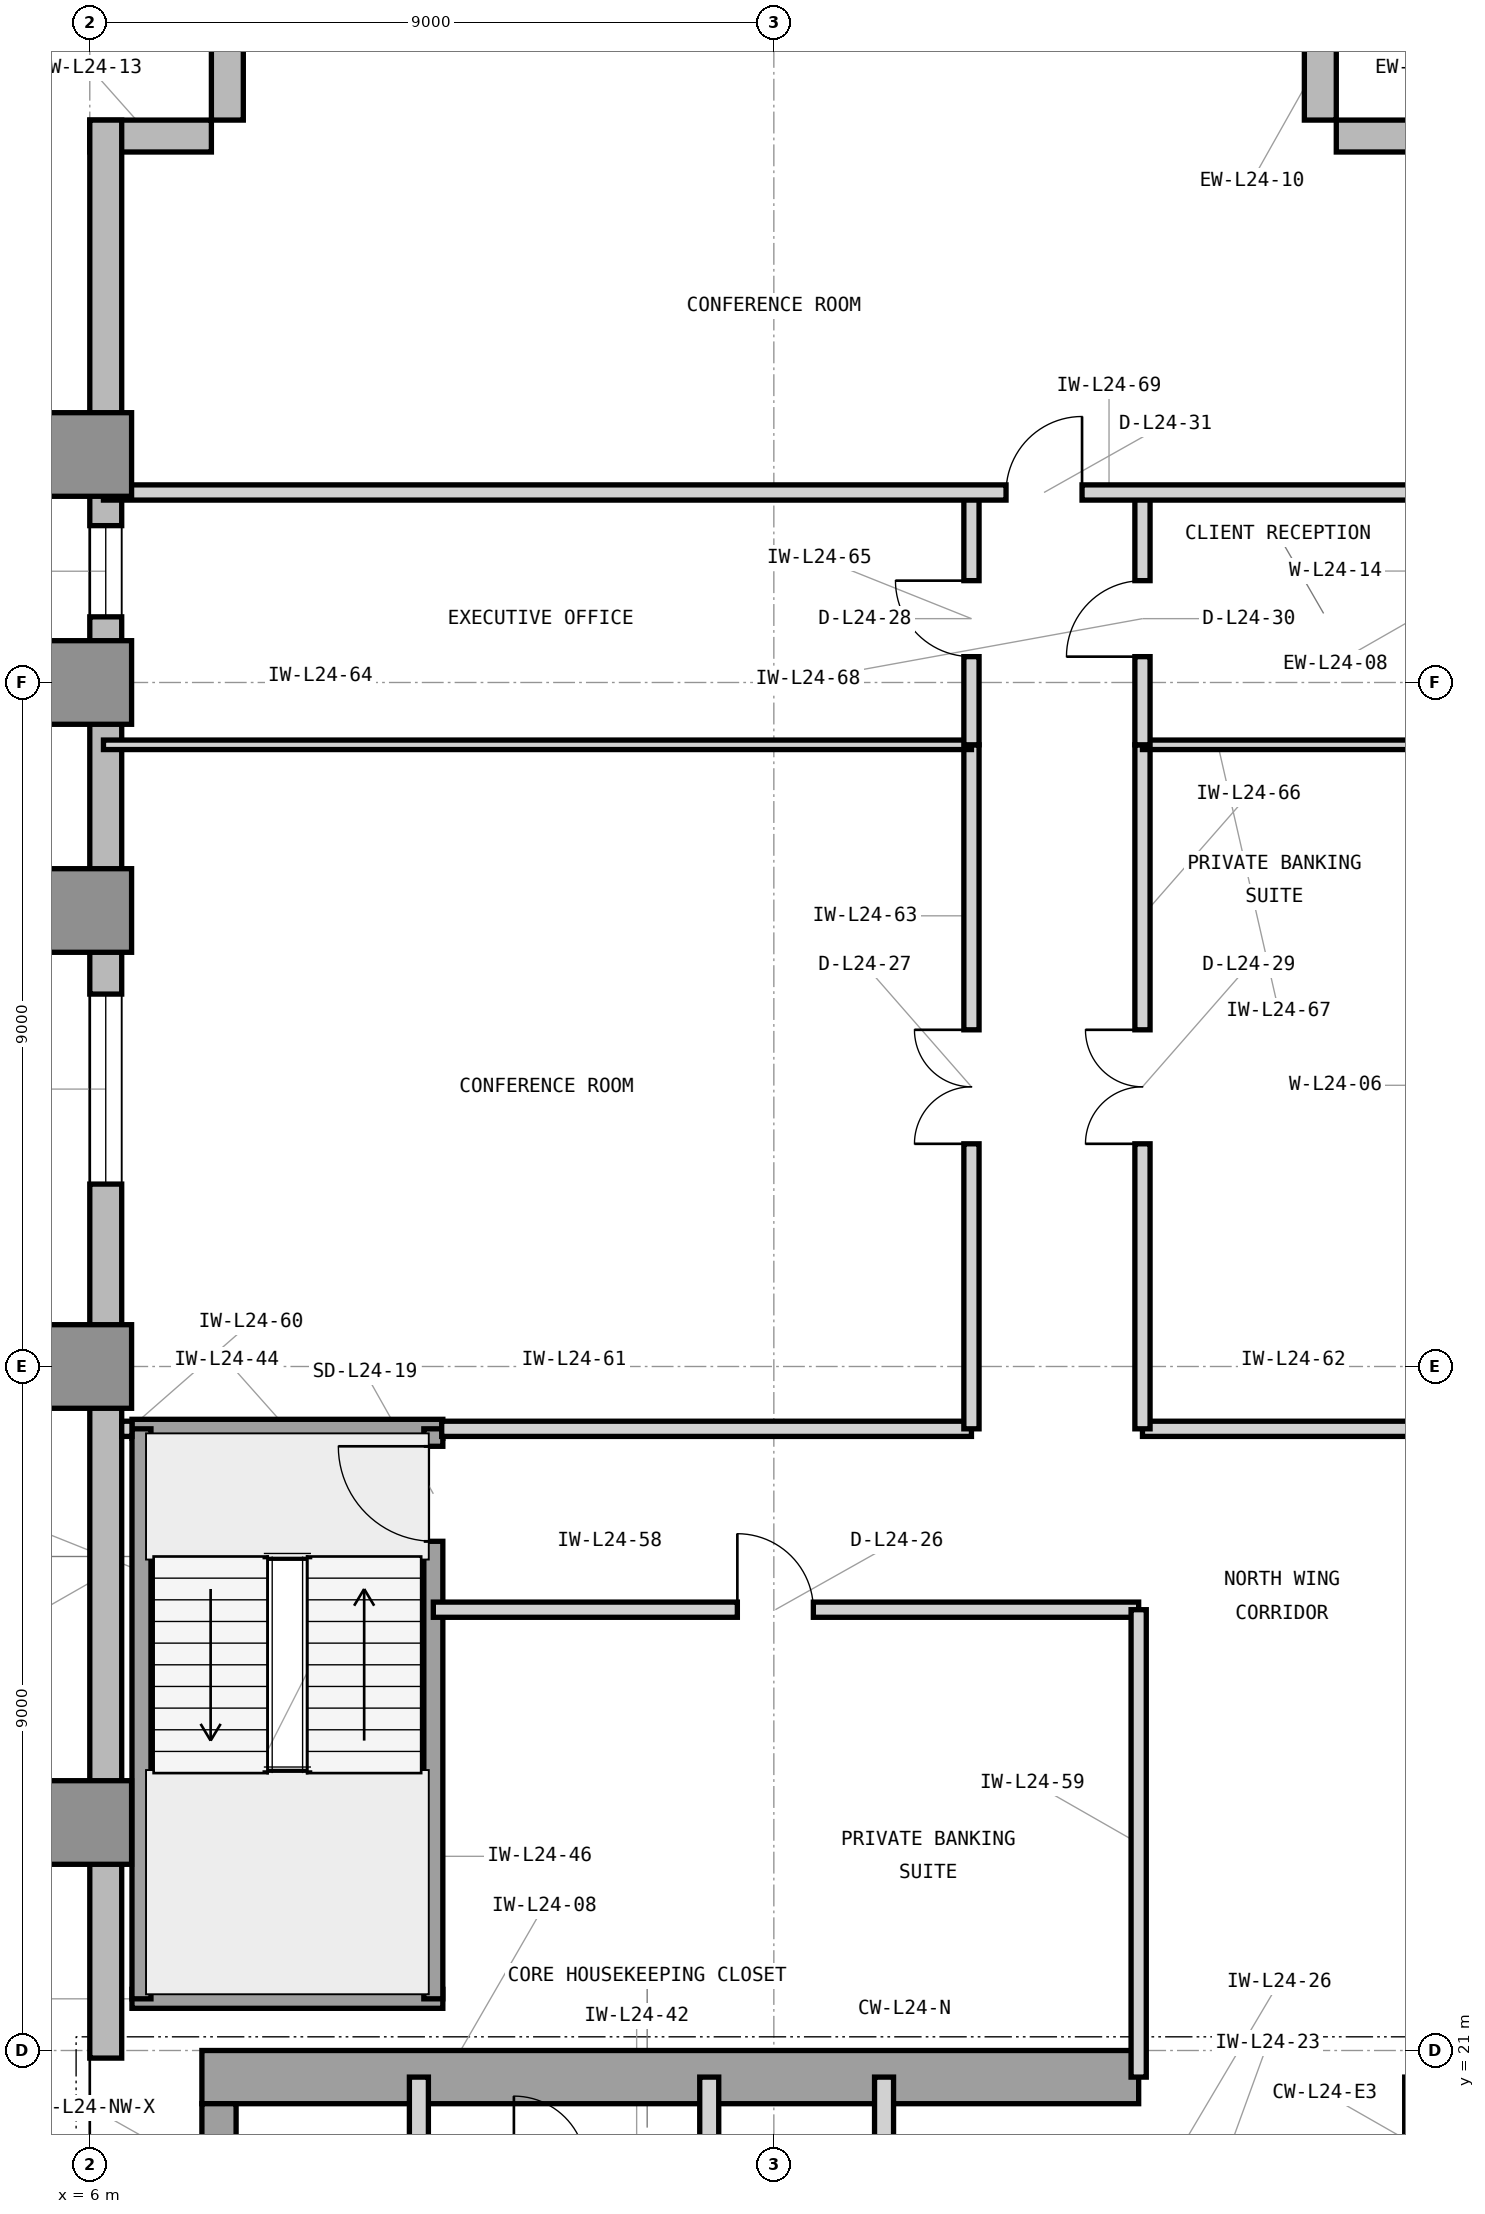
"""IFC4 building model, lengths in metres.
Left out: names, types, materials, properties, quantities, classifications, styles, units other than length and angle.
Written with IfcOpenShell. Run it as: python <this file> out.ifc"""

import sys

from ifc_helpers import new_model, si_unit, direction, frame, frame_2d, origin, origin_2d, place, context, subcontext, project, spatial, rectangle, extrude, element, fill, save


model = new_model("IFC4")
c1 = context("Model", 3, precision=1e-05, world=origin(), true_north=direction((0.0, 1.0)))
c2 = subcontext(c1, "Body", "Model", "MODEL_VIEW")
j1 = project(units=[si_unit("LENGTHUNIT", "METRE"), si_unit("PLANEANGLEUNIT", "RADIAN")], contexts=[c1])
p1 = place(None, origin())
s1 = spatial("IfcSite", under=j1, at=p1, CompositionType="ELEMENT")
p2 = place(p1, origin())
s2 = spatial("IfcBuilding", under=s1, at=p2, CompositionType="ELEMENT")
p3 = place(p2, frame((0.0, 0.0, 105.0)))
s3 = spatial("IfcBuildingStorey", under=s2, at=p3, CompositionType="ELEMENT", Elevation=105.0)
p4 = place(p3, frame((7.475, 20.65, 0.0), z_axis=(0.0, 0.0, 1.0), x_axis=(1.0, 0.0, 0.0)))
e1 = element("IfcWall", 1, at=p4, inside=s3, PredefinedType="SHEAR", context=c2, shape_type="SweptSolid", body=[
    extrude(rectangle(XDim=12.325, YDim=0.7, at=frame_2d((6.163, 0.0))), origin(), (0.0, 0.0, 1.0), 3.9),
])
p5 = place(p3, frame((23.65, 16.6, 0.0), z_axis=(0.0, 0.0, 1.0), x_axis=(0.0, 1.0, 0.0)))
e2 = element("IfcWall", 2, at=p5, inside=s3, PredefinedType="SHEAR", context=c2, shape_type="SweptSolid", body=[
    extrude(rectangle(XDim=4.05, YDim=0.7, at=frame_2d((2.025, 0.0))), origin(), (0.0, 0.0, 1.0), 3.9),
])
p6 = place(p3, frame((7.7, 19.575, 0.0), z_axis=(0.0, 0.0, 1.0), x_axis=(0.0, 1.0, 0.0)))
e3 = element("IfcWall", 3, at=p6, inside=s3, PredefinedType="SHEAR", context=c2, shape_type="SweptSolid", body=[
    extrude(rectangle(XDim=0.725, YDim=0.45, at=frame_2d((0.363, 0.0))), origin(), (0.0, 0.0, 1.0), 3.9),
])
for number, where, z_axis, x_axis in (
    (4, (6.0, 24.0, 0.0), (0.0, 0.0, 1.0), (1.0, 0.0, 0.0)),
    (5, (6.0, 30.0, 0.0), (0.0, 0.0, 1.0), (1.0, 0.0, 0.0)),
    (6, (6.0, 36.0, 0.0), (0.0, 0.0, 1.0), (1.0, 0.0, 0.0)),
    (7, (6.0, 39.0, 0.0), (0.0, 0.0, 1.0), (1.0, 0.0, 0.0)),
    (8, (6.0, 42.0, 0.0), (0.0, 0.0, 1.0), (1.0, 0.0, 0.0)),
):
    element("IfcColumn", number, at=place(p3, frame(where, z_axis=z_axis, x_axis=x_axis)), inside=s3, PredefinedType="COLUMN", context=c2, shape_type="SweptSolid", body=[
        extrude(rectangle(XDim=1.1, YDim=1.1, at=origin_2d()), origin(), (0.0, 0.0, 1.0), 3.9),
    ])
for number, where, z_axis, x_axis in (
    (9, (24.0, 46.19, 0.0), (0.0, 0.0, 1.0), (-1.0, 0.0, 0.0)),
    (10, (22.19, 46.4, 0.0), (0.0, 0.0, 1.0), (0.0, 1.0, 0.0)),
    (11, (7.81, 48.0, 0.0), (0.0, 0.0, 1.0), (0.0, -1.0, 0.0)),
    (12, (7.6, 46.19, 0.0), (0.0, 0.0, 1.0), (-1.0, 0.0, 0.0)),
):
    element("IfcWall", number, at=place(p3, frame(where, z_axis=z_axis, x_axis=x_axis)), inside=s3, PredefinedType="STANDARD", context=c2, shape_type="SweptSolid", body=[
        extrude(rectangle(XDim=1.6, YDim=0.42, at=frame_2d((0.8, 0.0))), origin(), (0.0, 0.0, 1.0), 3.7),
    ])
p7 = place(p3, frame((6.21, 46.4, 0.0), z_axis=(0.0, 0.0, 1.0), x_axis=(0.0, -1.0, 0.0)))
e13 = element("IfcWall", 13, at=p7, inside=s3, PredefinedType="STANDARD", context=c2, shape_type="SweptSolid", body=[
    extrude(rectangle(XDim=25.5, YDim=0.42, at=frame_2d((12.75, 0.0))), origin(), (0.0, 0.0, 1.0), 3.7),
])
p8 = place(p7, frame((11.5, 0.0, 0.85)))
e14 = element("IfcOpeningElement", 14, at=p8, cuts=e13, PredefinedType="OPENING", context=c2, shape_type="SweptSolid", body=[
    extrude(rectangle(XDim=2.5, YDim=2.25, at=frame_2d((1.25, 1.125))), frame((0.0, 0.22, 0.0), z_axis=(0.0, -1.0, 0.0), x_axis=(1.0, 0.0, 0.0)), (0.0, 0.0, 1.0), 0.44),
])
p9 = place(p7, frame((5.336, 0.0, 0.85)))
e15 = element("IfcOpeningElement", 15, at=p9, cuts=e13, PredefinedType="OPENING", context=c2, shape_type="SweptSolid", body=[
    extrude(rectangle(XDim=1.2, YDim=2.25, at=frame_2d((0.6, 1.125))), frame((0.0, 0.22, 0.0), z_axis=(0.0, -1.0, 0.0), x_axis=(1.0, 0.0, 0.0)), (0.0, 0.0, 1.0), 0.44),
])
p10 = place(p3, frame((10.33, 19.45, 0.0), z_axis=(0.0, 0.0, 1.0), x_axis=(0.0, 1.0, 0.0)))
e16 = element("IfcWall", 16, at=p10, inside=s3, PredefinedType="PARTITIONING", context=c2, shape_type="SweptSolid", body=[
    extrude(rectangle(XDim=1.2, YDim=0.25, at=frame_2d((0.6, 0.0))), origin(), (0.0, 0.0, 1.0), 2.917),
])
for number, where, z_axis, x_axis in (
    (17, (14.15, 16.7, 0.0), (0.0, 0.0, 1.0), (0.0, 1.0, 0.0)),
    (18, (16.45, 16.7, 0.0), (0.0, 0.0, 1.0), (0.0, 1.0, 0.0)),
):
    element("IfcWall", number, at=place(p3, frame(where, z_axis=z_axis, x_axis=x_axis)), inside=s3, PredefinedType="PARTITIONING", context=c2, shape_type="SweptSolid", body=[
        extrude(rectangle(XDim=3.95, YDim=0.25, at=frame_2d((1.975, 0.0))), origin(), (0.0, 0.0, 1.0), 3.69),
    ])
for number, where, z_axis, x_axis in (
    (19, (6.555, 21.68, 0.0), (0.0, 0.0, 1.0), (1.0, 0.0, 0.0)),
    (20, (6.555, 29.18, 0.0), (0.0, 0.0, 1.0), (1.0, 0.0, 0.0)),
):
    element("IfcWall", number, at=place(p3, frame(where, z_axis=z_axis, x_axis=x_axis)), inside=s3, PredefinedType="SHEAR", context=c2, shape_type="SweptSolid", body=[
        extrude(rectangle(XDim=4.09, YDim=0.25, at=frame_2d((2.045, 0.0))), origin(), (0.0, 0.0, 1.0), 3.9),
    ])
p11 = place(p3, frame((6.68, 21.68, 0.0), z_axis=(0.0, 0.0, 1.0), x_axis=(0.0, 1.0, 0.0)))
e21 = element("IfcWall", 21, at=p11, inside=s3, PredefinedType="SHEAR", context=c2, shape_type="SweptSolid", body=[
    extrude(rectangle(XDim=7.5, YDim=0.25, at=frame_2d((3.75, 0.0))), origin(), (0.0, 0.0, 1.0), 3.9),
])
p12 = place(p3, frame((10.52, 21.68, 0.0), z_axis=(0.0, 0.0, 1.0), x_axis=(0.0, 1.0, 0.0)))
e22 = element("IfcWall", 22, at=p12, inside=s3, PredefinedType="SHEAR", context=c2, shape_type="SweptSolid", body=[
    extrude(rectangle(XDim=7.5, YDim=0.25, at=frame_2d((3.75, 0.0))), origin(), (0.0, 0.0, 1.0), 3.9),
])
p13 = place(p12, frame((6.02, 0.0, 0.0)))
e23 = element("IfcOpeningElement", 23, at=p13, cuts=e22, PredefinedType="OPENING", context=c2, shape_type="SweptSolid", body=[
    extrude(rectangle(XDim=1.25, YDim=2.2, at=frame_2d((0.625, 1.1))), frame((0.0, 0.135, 0.0), z_axis=(0.0, -1.0, 0.0), x_axis=(1.0, 0.0, 0.0)), (0.0, 0.0, 1.0), 0.27),
])
p14 = place(p3, frame((10.52, 26.8, 0.0), z_axis=(0.0, 0.0, 1.0), x_axis=(1.0, 0.0, 0.0)))
e24 = element("IfcWall", 24, at=p14, inside=s3, PredefinedType="PARTITIONING", context=c2, shape_type="SweptSolid", body=[
    extrude(rectangle(XDim=9.28, YDim=0.2, at=frame_2d((4.64, 0.0))), origin(), (0.0, 0.0, 1.0), 3.69),
])
p15 = place(p14, frame((4.0, 0.0, 0.0)))
e25 = element("IfcOpeningElement", 25, at=p15, cuts=e24, PredefinedType="OPENING", context=c2, shape_type="SweptSolid", body=[
    extrude(rectangle(XDim=1.0, YDim=2.15, at=frame_2d((0.5, 1.075))), frame((0.0, 0.11, 0.0), z_axis=(0.0, -1.0, 0.0), x_axis=(1.0, 0.0, 0.0)), (0.0, 0.0, 1.0), 0.22),
])
p16 = place(p3, frame((19.8, 20.65, 0.0), z_axis=(0.0, 0.0, 1.0), x_axis=(0.0, 1.0, 0.0)))
e26 = element("IfcWall", 26, at=p16, inside=s3, PredefinedType="PARTITIONING", context=c2, shape_type="SweptSolid", body=[
    extrude(rectangle(XDim=6.15, YDim=0.2, at=frame_2d((3.075, 0.0))), origin(), (0.0, 0.0, 1.0), 3.69),
])
p17 = place(p3, frame((6.42, 29.18, 0.0), z_axis=(0.0, 0.0, 1.0), x_axis=(1.0, 0.0, 0.0)))
e27 = element("IfcWall", 27, at=p17, inside=s3, PredefinedType="PARTITIONING", context=c2, shape_type="SweptSolid", body=[
    extrude(rectangle(XDim=0.135, YDim=0.2, at=frame_2d((0.067, 0.0))), origin(), (0.0, 0.0, 1.0), 3.69),
])
p18 = place(p3, frame((10.63, 29.18, 0.0), z_axis=(0.0, 0.0, 1.0), x_axis=(1.0, 0.0, 0.0)))
e28 = element("IfcWall", 28, at=p18, inside=s3, PredefinedType="PARTITIONING", context=c2, shape_type="SweptSolid", body=[
    extrude(rectangle(XDim=6.97, YDim=0.2, at=frame_2d((3.485, 0.0))), origin(), (0.0, 0.0, 1.0), 3.69),
])
p19 = place(p3, frame((19.85, 29.18, 0.0), z_axis=(0.0, 0.0, 1.0), x_axis=(1.0, 0.0, 0.0)))
e29 = element("IfcWall", 29, at=p19, inside=s3, PredefinedType="PARTITIONING", context=c2, shape_type="SweptSolid", body=[
    extrude(rectangle(XDim=3.97, YDim=0.2, at=frame_2d((1.985, 0.0))), origin(), (0.0, 0.0, 1.0), 3.69),
])
p20 = place(p3, frame((17.6, 29.18, 0.0), z_axis=(0.0, 0.0, 1.0), x_axis=(0.0, 1.0, 0.0)))
e30 = element("IfcWall", 30, at=p20, inside=s3, PredefinedType="PARTITIONING", context=c2, shape_type="SweptSolid", body=[
    extrude(rectangle(XDim=9.0, YDim=0.2, at=frame_2d((4.5, 0.0))), origin(), (0.0, 0.0, 1.0), 3.69),
])
p21 = place(p20, frame((3.75, 0.0, 0.0)))
e31 = element("IfcOpeningElement", 31, at=p21, cuts=e30, PredefinedType="OPENING", context=c2, shape_type="SweptSolid", body=[
    extrude(rectangle(XDim=1.5, YDim=2.3, at=frame_2d((0.75, 1.15))), frame((0.0, 0.11, 0.0), z_axis=(0.0, -1.0, 0.0), x_axis=(1.0, 0.0, 0.0)), (0.0, 0.0, 1.0), 0.22),
])
p22 = place(p3, frame((6.18, 38.18, 0.0), z_axis=(0.0, 0.0, 1.0), x_axis=(1.0, 0.0, 0.0)))
e32 = element("IfcWall", 32, at=p22, inside=s3, PredefinedType="PARTITIONING", context=c2, shape_type="SweptSolid", body=[
    extrude(rectangle(XDim=11.42, YDim=0.125, at=frame_2d((5.71, 0.0))), origin(), (0.0, 0.0, 1.0), 3.69),
])
p23 = place(p3, frame((17.6, 38.18, 0.0), z_axis=(0.0, 0.0, 1.0), x_axis=(0.0, 1.0, 0.0)))
e33 = element("IfcWall", 33, at=p23, inside=s3, PredefinedType="PARTITIONING", context=c2, shape_type="SweptSolid", body=[
    extrude(rectangle(XDim=3.32, YDim=0.2, at=frame_2d((1.66, 0.0))), origin(), (0.0, 0.0, 1.0), 3.69),
])
p24 = place(p23, frame((1.16, 0.0, 0.0)))
e34 = element("IfcOpeningElement", 34, at=p24, cuts=e33, PredefinedType="OPENING", context=c2, shape_type="SweptSolid", body=[
    extrude(rectangle(XDim=1.0, YDim=2.15, at=frame_2d((0.5, 1.075))), frame((0.0, 0.11, 0.0), z_axis=(0.0, -1.0, 0.0), x_axis=(1.0, 0.0, 0.0)), (0.0, 0.0, 1.0), 0.22),
])
p25 = place(p3, frame((19.85, 29.18, 0.0), z_axis=(0.0, 0.0, 1.0), x_axis=(0.0, 1.0, 0.0)))
e35 = element("IfcWall", 35, at=p25, inside=s3, PredefinedType="PARTITIONING", context=c2, shape_type="SweptSolid", body=[
    extrude(rectangle(XDim=9.0, YDim=0.2, at=frame_2d((4.5, 0.0))), origin(), (0.0, 0.0, 1.0), 3.69),
])
p26 = place(p25, frame((3.75, 0.0, 0.0)))
e36 = element("IfcOpeningElement", 36, at=p26, cuts=e35, PredefinedType="OPENING", context=c2, shape_type="SweptSolid", body=[
    extrude(rectangle(XDim=1.5, YDim=2.3, at=frame_2d((0.75, 1.15))), frame((0.0, 0.11, 0.0), z_axis=(0.0, -1.0, 0.0), x_axis=(1.0, 0.0, 0.0)), (0.0, 0.0, 1.0), 0.22),
])
p27 = place(p3, frame((19.85, 38.18, 0.0), z_axis=(0.0, 0.0, 1.0), x_axis=(1.0, 0.0, 0.0)))
e37 = element("IfcWall", 37, at=p27, inside=s3, PredefinedType="PARTITIONING", context=c2, shape_type="SweptSolid", body=[
    extrude(rectangle(XDim=3.97, YDim=0.125, at=frame_2d((1.985, 0.0))), origin(), (0.0, 0.0, 1.0), 3.69),
])
p28 = place(p3, frame((19.85, 38.18, 0.0), z_axis=(0.0, 0.0, 1.0), x_axis=(0.0, 1.0, 0.0)))
e38 = element("IfcWall", 38, at=p28, inside=s3, PredefinedType="PARTITIONING", context=c2, shape_type="SweptSolid", body=[
    extrude(rectangle(XDim=3.32, YDim=0.2, at=frame_2d((1.66, 0.0))), origin(), (0.0, 0.0, 1.0), 3.69),
])
p29 = place(p28, frame((1.16, 0.0, 0.0)))
e39 = element("IfcOpeningElement", 39, at=p29, cuts=e38, PredefinedType="OPENING", context=c2, shape_type="SweptSolid", body=[
    extrude(rectangle(XDim=1.0, YDim=2.15, at=frame_2d((0.5, 1.075))), frame((0.0, 0.11, 0.0), z_axis=(0.0, -1.0, 0.0), x_axis=(1.0, 0.0, 0.0)), (0.0, 0.0, 1.0), 0.22),
])
p30 = place(p3, frame((6.18, 41.5, 0.0), z_axis=(0.0, 0.0, 1.0), x_axis=(1.0, 0.0, 0.0)))
e40 = element("IfcWall", 40, at=p30, inside=s3, PredefinedType="PARTITIONING", context=c2, shape_type="SweptSolid", body=[
    extrude(rectangle(XDim=17.64, YDim=0.2, at=frame_2d((8.82, 0.0))), origin(), (0.0, 0.0, 1.0), 3.69),
])
p31 = place(p30, frame((11.875, 0.0, 0.0)))
e41 = element("IfcOpeningElement", 41, at=p31, cuts=e40, PredefinedType="OPENING", context=c2, shape_type="SweptSolid", body=[
    extrude(rectangle(XDim=1.0, YDim=2.15, at=frame_2d((0.5, 1.075))), frame((0.0, 0.11, 0.0), z_axis=(0.0, -1.0, 0.0), x_axis=(1.0, 0.0, 0.0)), (0.0, 0.0, 1.0), 0.22),
])
p32 = place(p8, origin())
e42 = element("IfcWindow", 42, at=p32, inside=s3, PartitioningType="SINGLE_PANEL", PredefinedType="WINDOW", context=c2, shape_type="SweptSolid", body=[
    extrude(rectangle(XDim=2.5, YDim=2.25, at=frame_2d((1.25, 1.125))), frame((0.0, 0.11, 0.0), z_axis=(0.0, -1.0, 0.0), x_axis=(1.0, 0.0, 0.0)), (0.0, 0.0, 1.0), 0.06),
])
fill(e14, e42)
p33 = place(p13, origin())
e43 = element("IfcDoor", 43, at=p33, inside=s3, OperationType="SINGLE_SWING_RIGHT", PredefinedType="DOOR", context=c2, shape_type="SweptSolid", body=[
    extrude(rectangle(XDim=1.25, YDim=2.2, at=frame_2d((0.625, 1.1))), frame((0.0, 0.025, 0.0), z_axis=(0.0, -1.0, 0.0), x_axis=(1.0, 0.0, 0.0)), (0.0, 0.0, 1.0), 0.05),
])
fill(e23, e43)
p34 = place(p15, origin())
e44 = element("IfcDoor", 44, at=p34, inside=s3, OperationType="SINGLE_SWING_LEFT", PredefinedType="DOOR", context=c2, shape_type="SweptSolid", body=[
    extrude(rectangle(XDim=1.0, YDim=2.15, at=frame_2d((0.5, 1.075))), frame((0.0, 0.025, 0.0), z_axis=(0.0, -1.0, 0.0), x_axis=(1.0, 0.0, 0.0)), (0.0, 0.0, 1.0), 0.05),
])
fill(e25, e44)
p35 = place(p21, origin())
e45 = element("IfcDoor", 45, at=p35, inside=s3, OperationType="DOUBLE_DOOR_SINGLE_SWING", PredefinedType="DOOR", context=c2, shape_type="SweptSolid", body=[
    extrude(rectangle(XDim=1.5, YDim=2.3, at=frame_2d((0.75, 1.15))), frame((0.0, 0.025, 0.0), z_axis=(0.0, -1.0, 0.0), x_axis=(1.0, 0.0, 0.0)), (0.0, 0.0, 1.0), 0.05),
])
fill(e31, e45)
p36 = place(p24, origin())
e46 = element("IfcDoor", 46, at=p36, inside=s3, OperationType="SINGLE_SWING_RIGHT", PredefinedType="DOOR", context=c2, shape_type="SweptSolid", body=[
    extrude(rectangle(XDim=1.0, YDim=2.15, at=frame_2d((0.5, 1.075))), frame((0.0, 0.025, 0.0), z_axis=(0.0, -1.0, 0.0), x_axis=(1.0, 0.0, 0.0)), (0.0, 0.0, 1.0), 0.05),
])
fill(e34, e46)
p37 = place(p26, origin())
e47 = element("IfcDoor", 47, at=p37, inside=s3, OperationType="DOUBLE_DOOR_SINGLE_SWING", PredefinedType="DOOR", context=c2, shape_type="SweptSolid", body=[
    extrude(rectangle(XDim=1.5, YDim=2.3, at=frame_2d((0.75, 1.15))), frame((0.0, 0.025, 0.0), z_axis=(0.0, -1.0, 0.0), x_axis=(1.0, 0.0, 0.0)), (0.0, 0.0, 1.0), 0.05),
])
fill(e36, e47)
p38 = place(p29, origin())
e48 = element("IfcDoor", 48, at=p38, inside=s3, OperationType="SINGLE_SWING_LEFT", PredefinedType="DOOR", context=c2, shape_type="SweptSolid", body=[
    extrude(rectangle(XDim=1.0, YDim=2.15, at=frame_2d((0.5, 1.075))), frame((0.0, 0.025, 0.0), z_axis=(0.0, -1.0, 0.0), x_axis=(1.0, 0.0, 0.0)), (0.0, 0.0, 1.0), 0.05),
])
fill(e39, e48)
p39 = place(p31, origin())
e49 = element("IfcDoor", 49, at=p39, inside=s3, OperationType="SINGLE_SWING_RIGHT", PredefinedType="DOOR", context=c2, shape_type="SweptSolid", body=[
    extrude(rectangle(XDim=1.0, YDim=2.15, at=frame_2d((0.5, 1.075))), frame((0.0, 0.025, 0.0), z_axis=(0.0, -1.0, 0.0), x_axis=(1.0, 0.0, 0.0)), (0.0, 0.0, 1.0), 0.05),
])
fill(e41, e49)
p40 = place(p9, origin())
e50 = element("IfcWindow", 50, at=p40, inside=s3, PartitioningType="SINGLE_PANEL", PredefinedType="WINDOW", context=c2, shape_type="SweptSolid", body=[
    extrude(rectangle(XDim=1.2, YDim=2.25, at=frame_2d((0.6, 1.125))), frame((0.0, 0.11, 0.0), z_axis=(0.0, -1.0, 0.0), x_axis=(1.0, 0.0, 0.0)), (0.0, 0.0, 1.0), 0.06),
])
fill(e15, e50)
save(model, sys.argv[1])
